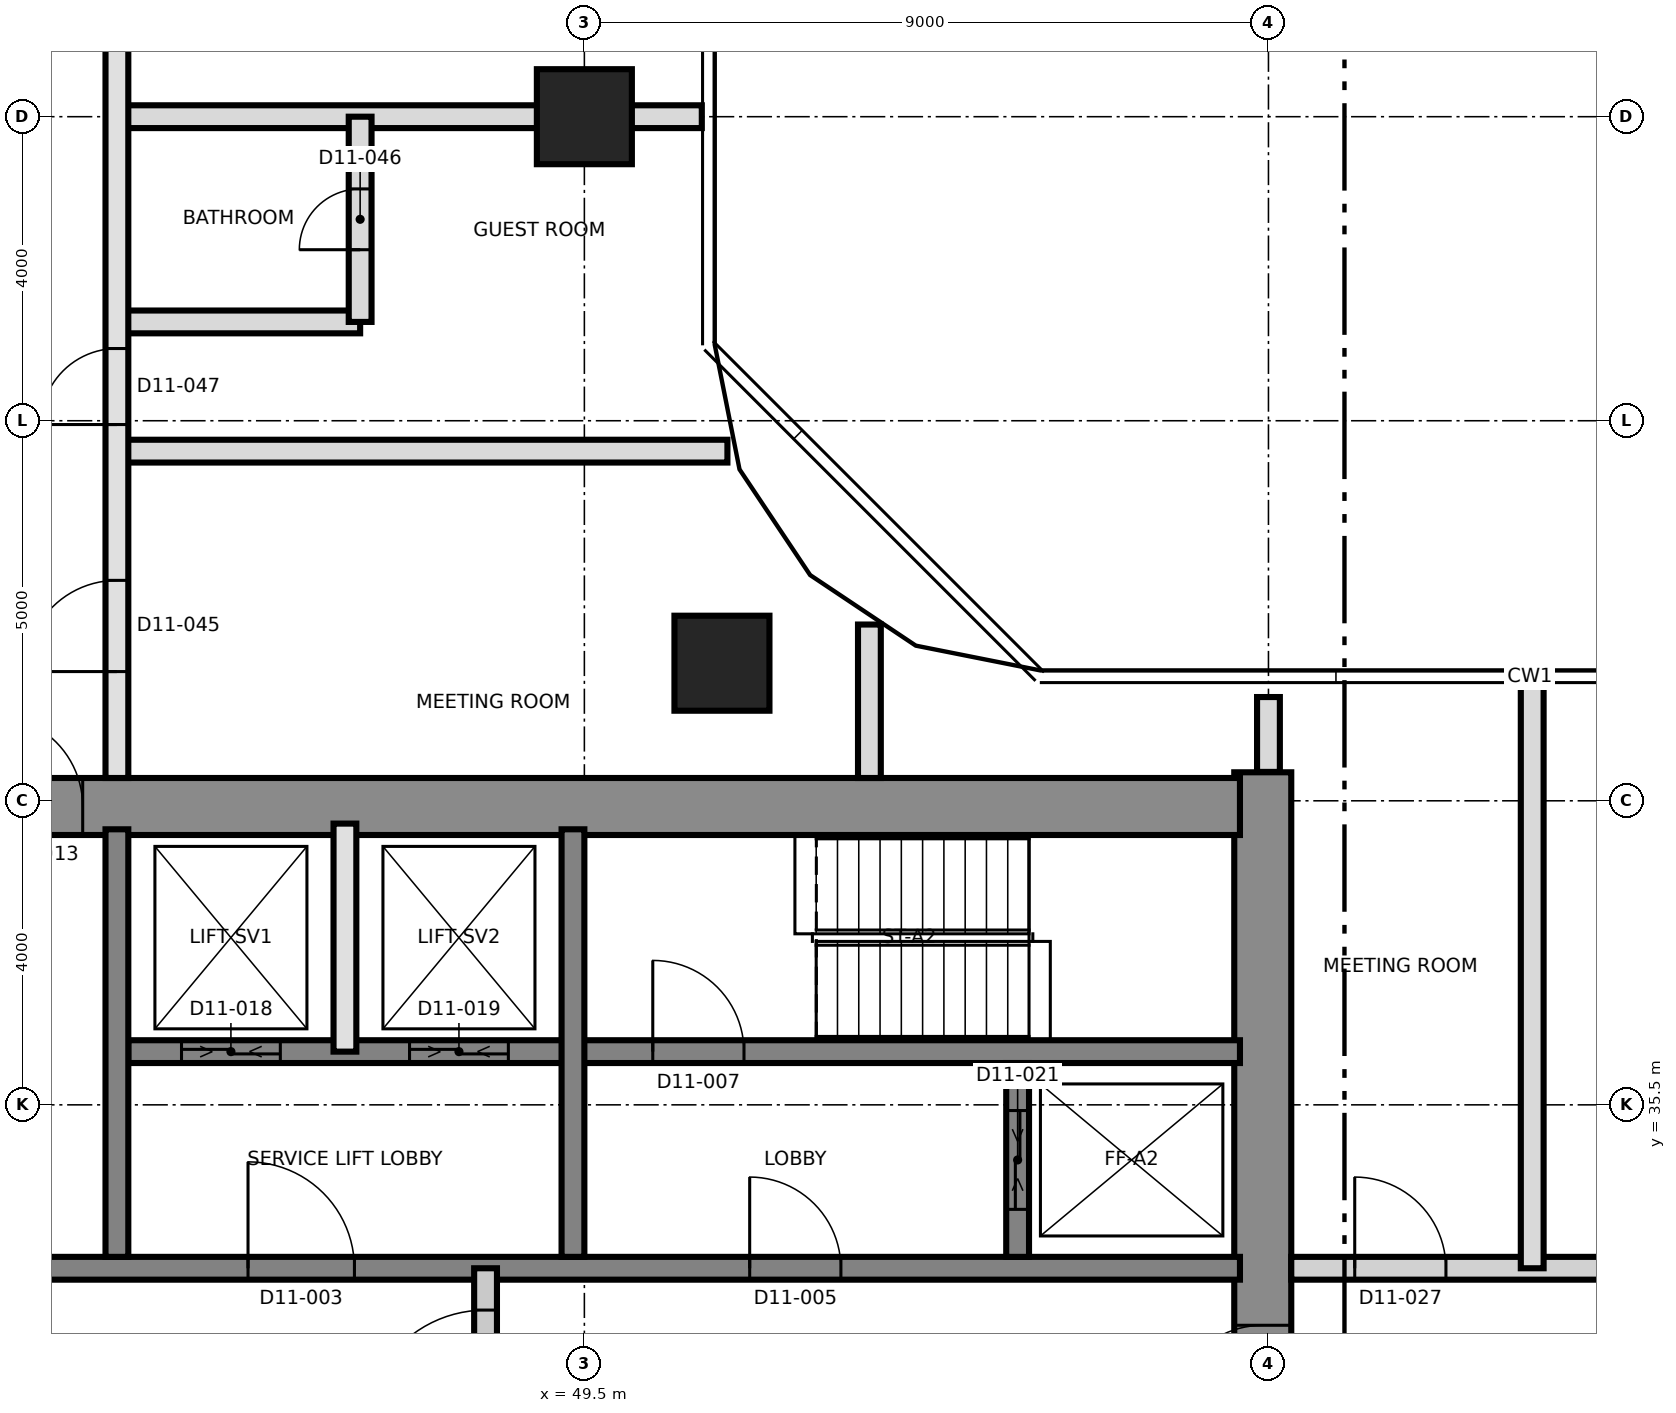
"""IFC4 building model, lengths in metres.
Left out: names, types, materials, properties, quantities, classifications, styles, units other than length and angle.
Written with IfcOpenShell. Run it as: python <this file> out.ifc"""

import sys

from ifc_helpers import new_model, si_unit, direction, frame, frame_2d, origin, origin_2d, place, context, subcontext, project, spatial, rectangle, extrude, element, fill, save


model = new_model("IFC4")
c1 = context("Model", 3, precision=1e-05, world=origin(), true_north=direction((0.0, 1.0)))
c2 = subcontext(c1, "Body", "Model", "MODEL_VIEW")
j1 = project(units=[si_unit("LENGTHUNIT", "METRE"), si_unit("PLANEANGLEUNIT", "RADIAN")], contexts=[c1])
p1 = place(None, origin())
s1 = spatial("IfcSite", under=j1, at=p1, CompositionType="ELEMENT")
p2 = place(p1, origin())
s2 = spatial("IfcBuilding", under=s1, at=p2, CompositionType="ELEMENT")
p3 = place(p2, frame((0.0, 0.0, 127.8)))
s3 = spatial("IfcBuildingStorey", under=s2, at=p3, CompositionType="ELEMENT", Elevation=127.8)
p4 = place(p3, frame((58.425, 21.125, 0.0), z_axis=(0.0, 0.0, 1.0), x_axis=(0.0, 1.0, 0.0)))
e1 = element("IfcWall", 1, at=p4, inside=s3, PredefinedType="SHEAR", context=c2, shape_type="SweptSolid", body=[
    extrude(rectangle(XDim=18.75, YDim=0.75, at=frame_2d((9.375, 0.0))), origin(), (0.0, 0.0, 1.0), 3.7),
])
p5 = place(p4, frame((10.275, 0.0, 0.0)))
e2 = element("IfcOpeningElement", 2, at=p5, cuts=e1, PredefinedType="OPENING", context=c2, shape_type="SweptSolid", body=[
    extrude(rectangle(XDim=1.2, YDim=2.1, at=frame_2d((0.6, 1.05))), frame((0.0, 0.385, 0.0), z_axis=(0.0, -1.0, 0.0), x_axis=(1.0, 0.0, 0.0)), (0.0, 0.0, 1.0), 0.77),
])
p6 = place(p3, frame((31.125, 39.425, 0.0), z_axis=(0.0, 0.0, 1.0), x_axis=(1.0, 0.0, 0.0)))
e3 = element("IfcWall", 3, at=p6, inside=s3, PredefinedType="SHEAR", context=c2, shape_type="SweptSolid", body=[
    extrude(rectangle(XDim=27.0, YDim=0.75, at=frame_2d((13.5, 0.0))), origin(), (0.0, 0.0, 1.0), 3.7),
])
p7 = place(p6, frame((10.575, 0.0, 0.0)))
e4 = element("IfcOpeningElement", 4, at=p7, cuts=e3, PredefinedType="OPENING", context=c2, shape_type="SweptSolid", body=[
    extrude(rectangle(XDim=1.2, YDim=2.1, at=frame_2d((0.6, 1.05))), frame((0.0, 0.385, 0.0), z_axis=(0.0, -1.0, 0.0), x_axis=(1.0, 0.0, 0.0)), (0.0, 0.0, 1.0), 0.77),
])
p8 = place(p3, frame((31.875, 33.35, 0.0), z_axis=(0.0, 0.0, 1.0), x_axis=(1.0, 0.0, 0.0)))
e5 = element("IfcWall", 5, at=p8, inside=s3, PredefinedType="SHEAR", context=c2, shape_type="SweptSolid", body=[
    extrude(rectangle(XDim=26.25, YDim=0.3, at=frame_2d((13.125, 0.0))), origin(), (0.0, 0.0, 1.0), 3.7),
])
p9 = place(p8, frame((13.2, 0.0, 0.0)))
e6 = element("IfcOpeningElement", 6, at=p9, cuts=e5, PredefinedType="OPENING", context=c2, shape_type="SweptSolid", body=[
    extrude(rectangle(XDim=1.4, YDim=2.1, at=frame_2d((0.7, 1.05))), frame((0.0, 0.16, 0.0), z_axis=(0.0, -1.0, 0.0), x_axis=(1.0, 0.0, 0.0)), (0.0, 0.0, 1.0), 0.32),
])
p10 = place(p8, frame((5.25, 0.0, 0.0)))
e7 = element("IfcOpeningElement", 7, at=p10, cuts=e5, PredefinedType="OPENING", context=c2, shape_type="SweptSolid", body=[
    extrude(rectangle(XDim=1.2, YDim=2.1, at=frame_2d((0.6, 1.05))), frame((0.0, 0.16, 0.0), z_axis=(0.0, -1.0, 0.0), x_axis=(1.0, 0.0, 0.0)), (0.0, 0.0, 1.0), 0.32),
])
p11 = place(p8, frame((19.8, 0.0, 0.0)))
e8 = element("IfcOpeningElement", 8, at=p11, cuts=e5, PredefinedType="OPENING", context=c2, shape_type="SweptSolid", body=[
    extrude(rectangle(XDim=1.2, YDim=2.1, at=frame_2d((0.6, 1.05))), frame((0.0, 0.16, 0.0), z_axis=(0.0, -1.0, 0.0), x_axis=(1.0, 0.0, 0.0)), (0.0, 0.0, 1.0), 0.32),
])
p12 = place(p3, frame((43.5, 36.2, 0.0), z_axis=(0.0, 0.0, 1.0), x_axis=(1.0, 0.0, 0.0)))
e9 = element("IfcWall", 9, at=p12, inside=s3, PredefinedType="SHEAR", context=c2, shape_type="SweptSolid", body=[
    extrude(rectangle(XDim=14.625, YDim=0.3, at=frame_2d((7.312, 0.0))), origin(), (0.0, 0.0, 1.0), 3.7),
])
p13 = place(p12, frame((6.9, 0.0, 0.0)))
e10 = element("IfcOpeningElement", 10, at=p13, cuts=e9, PredefinedType="OPENING", context=c2, shape_type="SweptSolid", body=[
    extrude(rectangle(XDim=1.2, YDim=2.1, at=frame_2d((0.6, 1.05))), frame((0.0, 0.16, 0.0), z_axis=(0.0, -1.0, 0.0), x_axis=(1.0, 0.0, 0.0)), (0.0, 0.0, 1.0), 0.32),
])
p14 = place(p12, frame((0.7, 0.0, 0.0)))
e11 = element("IfcOpeningElement", 11, at=p14, cuts=e9, PredefinedType="OPENING", context=c2, shape_type="SweptSolid", body=[
    extrude(rectangle(XDim=1.3, YDim=2.4, at=frame_2d((0.65, 1.2))), frame((0.0, 0.16, 0.0), z_axis=(0.0, -1.0, 0.0), x_axis=(1.0, 0.0, 0.0)), (0.0, 0.0, 1.0), 0.32),
])
p15 = place(p12, frame((3.7, 0.0, 0.0)))
e12 = element("IfcOpeningElement", 12, at=p15, cuts=e9, PredefinedType="OPENING", context=c2, shape_type="SweptSolid", body=[
    extrude(rectangle(XDim=1.3, YDim=2.4, at=frame_2d((0.65, 1.2))), frame((0.0, 0.16, 0.0), z_axis=(0.0, -1.0, 0.0), x_axis=(1.0, 0.0, 0.0)), (0.0, 0.0, 1.0), 0.32),
])
for number, where, z_axis, x_axis in (
    (13, (43.35, 33.5, 0.0), (0.0, 0.0, 1.0), (0.0, 1.0, 0.0)),
    (14, (49.35, 33.5, 0.0), (0.0, 0.0, 1.0), (0.0, 1.0, 0.0)),
):
    element("IfcWall", number, at=place(p3, frame(where, z_axis=z_axis, x_axis=x_axis)), inside=s3, PredefinedType="SHEAR", context=c2, shape_type="SweptSolid", body=[
        extrude(rectangle(XDim=5.625, YDim=0.3, at=frame_2d((2.812, 0.0))), origin(), (0.0, 0.0, 1.0), 3.7),
    ])
p16 = place(p3, frame((55.2, 33.5, 0.0), z_axis=(0.0, 0.0, 1.0), x_axis=(0.0, 1.0, 0.0)))
e15 = element("IfcWall", 15, at=p16, inside=s3, PredefinedType="SHEAR", context=c2, shape_type="SweptSolid", body=[
    extrude(rectangle(XDim=2.55, YDim=0.3, at=frame_2d((1.275, 0.0))), origin(), (0.0, 0.0, 1.0), 3.7),
])
p17 = place(p16, frame((0.625, 0.0, 0.0)))
e16 = element("IfcOpeningElement", 16, at=p17, cuts=e15, PredefinedType="OPENING", context=c2, shape_type="SweptSolid", body=[
    extrude(rectangle(XDim=1.3, YDim=2.4, at=frame_2d((0.65, 1.2))), frame((0.0, 0.16, 0.0), z_axis=(0.0, -1.0, 0.0), x_axis=(1.0, 0.0, 0.0)), (0.0, 0.0, 1.0), 0.32),
])
for number, where, z_axis, x_axis in (
    (17, (51.31, 41.31, 0.0), (0.0, 0.0, 1.0), (1.0, 0.0, 0.0)),
    (18, (49.5, 48.5, 0.0), (0.0, 0.0, 1.0), (1.0, 0.0, 0.0)),
):
    element("IfcColumn", number, at=place(p3, frame(where, z_axis=z_axis, x_axis=x_axis)), inside=s3, PredefinedType="COLUMN", context=c2, shape_type="SweptSolid", body=[
        extrude(rectangle(XDim=1.25, YDim=1.25, at=origin_2d()), origin(), (0.0, 0.0, 1.0), 3.7),
    ])
p18 = place(p3, frame((46.35, 36.2, 0.0), z_axis=(0.0, 0.0, 1.0), x_axis=(0.0, 1.0, 0.0)))
e19 = element("IfcWall", 19, at=p18, inside=s3, PredefinedType="SOLIDWALL", context=c2, shape_type="SweptSolid", body=[
    extrude(rectangle(XDim=3.0, YDim=0.3, at=frame_2d((1.5, 0.0))), origin(), (0.0, 0.0, 1.0), 3.4),
])
p19 = place(p3, frame((48.2, 24.9, 0.0), z_axis=(0.0, 0.0, 1.0), x_axis=(0.0, 1.0, 0.0)))
e20 = element("IfcWall", 20, at=p19, inside=s3, PredefinedType="PARTITIONING", context=c2, shape_type="SweptSolid", body=[
    extrude(rectangle(XDim=8.45, YDim=0.3, at=frame_2d((4.225, 0.0))), origin(), (0.0, 0.0, 1.0), 3.4),
])
p20 = place(p19, frame((6.3, 0.0, 0.0)))
e21 = element("IfcOpeningElement", 21, at=p20, cuts=e20, PredefinedType="OPENING", context=c2, shape_type="SweptSolid", body=[
    extrude(rectangle(XDim=1.6, YDim=2.1, at=frame_2d((0.8, 1.05))), frame((0.0, 0.16, 0.0), z_axis=(0.0, -1.0, 0.0), x_axis=(1.0, 0.0, 0.0)), (0.0, 0.0, 1.0), 0.32),
])
p21 = place(p3, frame((58.8, 33.35, 0.0), z_axis=(0.0, 0.0, 1.0), x_axis=(1.0, 0.0, 0.0)))
e22 = element("IfcWall", 22, at=p21, inside=s3, PredefinedType="PARTITIONING", context=c2, shape_type="SweptSolid", body=[
    extrude(rectangle(XDim=26.53, YDim=0.3, at=frame_2d((13.265, 0.0))), origin(), (0.0, 0.0, 1.0), 3.4),
])
p22 = place(p21, frame((0.835, 0.0, 0.0)))
e23 = element("IfcOpeningElement", 23, at=p22, cuts=e22, PredefinedType="OPENING", context=c2, shape_type="SweptSolid", body=[
    extrude(rectangle(XDim=1.2, YDim=2.1, at=frame_2d((0.6, 1.05))), frame((0.0, 0.16, 0.0), z_axis=(0.0, -1.0, 0.0), x_axis=(1.0, 0.0, 0.0)), (0.0, 0.0, 1.0), 0.32),
])
p23 = place(p21, frame((4.085, 0.0, 0.0)))
e24 = element("IfcOpeningElement", 24, at=p23, cuts=e22, PredefinedType="OPENING", context=c2, shape_type="SweptSolid", body=[
    extrude(rectangle(XDim=1.0, YDim=2.1, at=frame_2d((0.5, 1.05))), frame((0.0, 0.16, 0.0), z_axis=(0.0, -1.0, 0.0), x_axis=(1.0, 0.0, 0.0)), (0.0, 0.0, 1.0), 0.32),
])
p24 = place(p21, frame((12.7, 0.0, 0.0)))
e25 = element("IfcOpeningElement", 25, at=p24, cuts=e22, PredefinedType="OPENING", context=c2, shape_type="SweptSolid", body=[
    extrude(rectangle(XDim=1.0, YDim=2.4, at=frame_2d((0.5, 1.2))), frame((0.0, 0.16, 0.0), z_axis=(0.0, -1.0, 0.0), x_axis=(1.0, 0.0, 0.0)), (0.0, 0.0, 1.0), 0.32),
])
p25 = place(p21, frame((21.115, 0.0, 0.0)))
e26 = element("IfcOpeningElement", 26, at=p25, cuts=e22, PredefinedType="OPENING", context=c2, shape_type="SweptSolid", body=[
    extrude(rectangle(XDim=1.0, YDim=2.1, at=frame_2d((0.5, 1.05))), frame((0.0, 0.16, 0.0), z_axis=(0.0, -1.0, 0.0), x_axis=(1.0, 0.0, 0.0)), (0.0, 0.0, 1.0), 0.32),
])
p26 = place(p21, frame((24.065, 0.0, 0.0)))
e27 = element("IfcOpeningElement", 27, at=p26, cuts=e22, PredefinedType="OPENING", context=c2, shape_type="SweptSolid", body=[
    extrude(rectangle(XDim=1.4, YDim=2.1, at=frame_2d((0.7, 1.05))), frame((0.0, 0.16, 0.0), z_axis=(0.0, -1.0, 0.0), x_axis=(1.0, 0.0, 0.0)), (0.0, 0.0, 1.0), 0.32),
])
p27 = place(p3, frame((43.35, 44.1, 0.0), z_axis=(0.0, 0.0, 1.0), x_axis=(1.0, 0.0, 0.0)))
e28 = element("IfcWall", 28, at=p27, inside=s3, PredefinedType="PARTITIONING", context=c2, shape_type="SweptSolid", body=[
    extrude(rectangle(XDim=8.032, YDim=0.3, at=frame_2d((4.016, 0.0))), origin(), (0.0, 0.0, 1.0), 3.4),
])
p28 = place(p3, frame((43.35, 45.8, 0.0), z_axis=(0.0, 0.0, 1.0), x_axis=(1.0, 0.0, 0.0)))
e29 = element("IfcWall", 29, at=p28, inside=s3, PredefinedType="PARTITIONING", context=c2, shape_type="SweptSolid", body=[
    extrude(rectangle(XDim=3.2, YDim=0.3, at=frame_2d((1.6, 0.0))), origin(), (0.0, 0.0, 1.0), 3.4),
])
p29 = place(p3, frame((43.35, 48.5, 0.0), z_axis=(0.0, 0.0, 1.0), x_axis=(1.0, 0.0, 0.0)))
e30 = element("IfcWall", 30, at=p29, inside=s3, PredefinedType="PARTITIONING", context=c2, shape_type="SweptSolid", body=[
    extrude(rectangle(XDim=7.695, YDim=0.3, at=frame_2d((3.847, 0.0))), origin(), (0.0, 0.0, 1.0), 3.4),
])
p30 = place(p3, frame((43.35, 39.8, 0.0), z_axis=(0.0, 0.0, 1.0), x_axis=(0.0, 1.0, 0.0)))
e31 = element("IfcWall", 31, at=p30, inside=s3, PredefinedType="SOLIDWALL", context=c2, shape_type="SweptSolid", body=[
    extrude(rectangle(XDim=26.0, YDim=0.3, at=frame_2d((13.0, 0.0))), origin(), (0.0, 0.0, 1.0), 3.4),
])
p31 = place(p30, frame((1.4, 0.0, 0.0)))
e32 = element("IfcOpeningElement", 32, at=p31, cuts=e31, PredefinedType="OPENING", context=c2, shape_type="SweptSolid", body=[
    extrude(rectangle(XDim=1.2, YDim=2.1, at=frame_2d((0.6, 1.05))), frame((0.0, 0.16, 0.0), z_axis=(0.0, -1.0, 0.0), x_axis=(1.0, 0.0, 0.0)), (0.0, 0.0, 1.0), 0.32),
])
p32 = place(p30, frame((4.65, 0.0, 0.0)))
e33 = element("IfcOpeningElement", 33, at=p32, cuts=e31, PredefinedType="OPENING", context=c2, shape_type="SweptSolid", body=[
    extrude(rectangle(XDim=1.0, YDim=2.1, at=frame_2d((0.5, 1.05))), frame((0.0, 0.16, 0.0), z_axis=(0.0, -1.0, 0.0), x_axis=(1.0, 0.0, 0.0)), (0.0, 0.0, 1.0), 0.32),
])
p33 = place(p30, frame((9.835, 0.0, 0.0)))
e34 = element("IfcOpeningElement", 34, at=p33, cuts=e31, PredefinedType="OPENING", context=c2, shape_type="SweptSolid", body=[
    extrude(rectangle(XDim=1.2, YDim=2.1, at=frame_2d((0.6, 1.05))), frame((0.0, 0.16, 0.0), z_axis=(0.0, -1.0, 0.0), x_axis=(1.0, 0.0, 0.0)), (0.0, 0.0, 1.0), 0.32),
])
p34 = place(p30, frame((13.085, 0.0, 0.0)))
e35 = element("IfcOpeningElement", 35, at=p34, cuts=e31, PredefinedType="OPENING", context=c2, shape_type="SweptSolid", body=[
    extrude(rectangle(XDim=1.0, YDim=2.1, at=frame_2d((0.5, 1.05))), frame((0.0, 0.16, 0.0), z_axis=(0.0, -1.0, 0.0), x_axis=(1.0, 0.0, 0.0)), (0.0, 0.0, 1.0), 0.32),
])
p35 = place(p30, frame((21.25, 0.0, 0.0)))
e36 = element("IfcOpeningElement", 36, at=p35, cuts=e31, PredefinedType="OPENING", context=c2, shape_type="SweptSolid", body=[
    extrude(rectangle(XDim=1.0, YDim=2.4, at=frame_2d((0.5, 1.2))), frame((0.0, 0.16, 0.0), z_axis=(0.0, -1.0, 0.0), x_axis=(1.0, 0.0, 0.0)), (0.0, 0.0, 1.0), 0.32),
])
p36 = place(p3, frame((46.55, 45.8, 0.0), z_axis=(0.0, 0.0, 1.0), x_axis=(0.0, 1.0, 0.0)))
e37 = element("IfcWall", 37, at=p36, inside=s3, PredefinedType="PARTITIONING", context=c2, shape_type="SweptSolid", body=[
    extrude(rectangle(XDim=2.7, YDim=0.3, at=frame_2d((1.35, 0.0))), origin(), (0.0, 0.0, 1.0), 3.4),
])
p37 = place(p36, frame((0.95, 0.0, 0.0)))
e38 = element("IfcOpeningElement", 38, at=p37, cuts=e37, PredefinedType="OPENING", context=c2, shape_type="SweptSolid", body=[
    extrude(rectangle(XDim=0.8, YDim=2.1, at=frame_2d((0.4, 1.05))), frame((0.0, 0.16, 0.0), z_axis=(0.0, -1.0, 0.0), x_axis=(1.0, 0.0, 0.0)), (0.0, 0.0, 1.0), 0.32),
])
p38 = place(p3, frame((53.25, 39.8, 0.0), z_axis=(0.0, 0.0, 1.0), x_axis=(0.0, 1.0, 0.0)))
e39 = element("IfcWall", 39, at=p38, inside=s3, PredefinedType="PARTITIONING", context=c2, shape_type="SweptSolid", body=[
    extrude(rectangle(XDim=2.019, YDim=0.3, at=frame_2d((1.01, 0.0))), origin(), (0.0, 0.0, 1.0), 3.4),
])
p39 = place(p3, frame((58.5, 39.88, 0.0), z_axis=(0.0, 0.0, 1.0), x_axis=(0.0, 1.0, 0.0)))
e40 = element("IfcWall", 40, at=p39, inside=s3, PredefinedType="PARTITIONING", context=c2, shape_type="SweptSolid", body=[
    extrude(rectangle(XDim=0.985, YDim=0.3, at=frame_2d((0.493, 0.0))), origin(), (0.0, 0.0, 1.0), 3.4),
])
p40 = place(p3, frame((61.97, 33.35, 0.0), z_axis=(0.0, 0.0, 1.0), x_axis=(0.0, 1.0, 0.0)))
e41 = element("IfcWall", 41, at=p40, inside=s3, PredefinedType="PARTITIONING", context=c2, shape_type="SweptSolid", body=[
    extrude(rectangle(XDim=7.695, YDim=0.3, at=frame_2d((3.847, 0.0))), origin(), (0.0, 0.0, 1.0), 3.4),
])
p41 = place(p20, origin())
e42 = element("IfcDoor", 42, at=p41, inside=s3, OperationType="SINGLE_SWING_LEFT", PredefinedType="DOOR", context=c2, shape_type="SweptSolid", body=[
    extrude(rectangle(XDim=1.6, YDim=2.1, at=frame_2d((0.8, 1.05))), frame((0.0, 0.025, 0.0), z_axis=(0.0, -1.0, 0.0), x_axis=(1.0, 0.0, 0.0)), (0.0, 0.0, 1.0), 0.05),
])
fill(e21, e42)
p42 = place(p9, origin())
e43 = element("IfcDoor", 43, at=p42, inside=s3, OperationType="SINGLE_SWING_RIGHT", PredefinedType="DOOR", context=c2, shape_type="SweptSolid", body=[
    extrude(rectangle(XDim=1.4, YDim=2.1, at=frame_2d((0.7, 1.05))), frame((0.0, 0.025, 0.0), z_axis=(0.0, -1.0, 0.0), x_axis=(1.0, 0.0, 0.0)), (0.0, 0.0, 1.0), 0.05),
])
fill(e6, e43)
p43 = place(p11, origin())
e44 = element("IfcDoor", 44, at=p43, inside=s3, OperationType="SINGLE_SWING_RIGHT", PredefinedType="DOOR", context=c2, shape_type="SweptSolid", body=[
    extrude(rectangle(XDim=1.2, YDim=2.1, at=frame_2d((0.6, 1.05))), frame((0.0, 0.025, 0.0), z_axis=(0.0, -1.0, 0.0), x_axis=(1.0, 0.0, 0.0)), (0.0, 0.0, 1.0), 0.05),
])
fill(e8, e44)
p44 = place(p13, origin())
e45 = element("IfcDoor", 45, at=p44, inside=s3, OperationType="SINGLE_SWING_LEFT", PredefinedType="DOOR", context=c2, shape_type="SweptSolid", body=[
    extrude(rectangle(XDim=1.2, YDim=2.1, at=frame_2d((0.6, 1.05))), frame((0.0, 0.025, 0.0), z_axis=(0.0, -1.0, 0.0), x_axis=(1.0, 0.0, 0.0)), (0.0, 0.0, 1.0), 0.05),
])
fill(e10, e45)
p45 = place(p5, origin())
e46 = element("IfcDoor", 46, at=p45, inside=s3, OperationType="SINGLE_SWING_LEFT", PredefinedType="DOOR", context=c2, shape_type="SweptSolid", body=[
    extrude(rectangle(XDim=1.2, YDim=2.1, at=frame_2d((0.6, 1.05))), frame((0.0, 0.025, 0.0), z_axis=(0.0, -1.0, 0.0), x_axis=(1.0, 0.0, 0.0)), (0.0, 0.0, 1.0), 0.05),
])
fill(e2, e46)
p46 = place(p7, origin())
e47 = element("IfcDoor", 47, at=p46, inside=s3, OperationType="SINGLE_SWING_RIGHT", PredefinedType="DOOR", context=c2, shape_type="SweptSolid", body=[
    extrude(rectangle(XDim=1.2, YDim=2.1, at=frame_2d((0.6, 1.05))), frame((0.0, 0.025, 0.0), z_axis=(0.0, -1.0, 0.0), x_axis=(1.0, 0.0, 0.0)), (0.0, 0.0, 1.0), 0.05),
])
fill(e4, e47)
p47 = place(p14, origin())
e48 = element("IfcDoor", 48, at=p47, inside=s3, OperationType="SLIDING_TO_LEFT", PredefinedType="DOOR", context=c2, shape_type="SweptSolid", body=[
    extrude(rectangle(XDim=1.3, YDim=2.4, at=frame_2d((0.65, 1.2))), frame((0.0, 0.025, 0.0), z_axis=(0.0, -1.0, 0.0), x_axis=(1.0, 0.0, 0.0)), (0.0, 0.0, 1.0), 0.05),
])
fill(e11, e48)
p48 = place(p15, origin())
e49 = element("IfcDoor", 49, at=p48, inside=s3, OperationType="SLIDING_TO_LEFT", PredefinedType="DOOR", context=c2, shape_type="SweptSolid", body=[
    extrude(rectangle(XDim=1.3, YDim=2.4, at=frame_2d((0.65, 1.2))), frame((0.0, 0.025, 0.0), z_axis=(0.0, -1.0, 0.0), x_axis=(1.0, 0.0, 0.0)), (0.0, 0.0, 1.0), 0.05),
])
fill(e12, e49)
p49 = place(p17, origin())
e50 = element("IfcDoor", 50, at=p49, inside=s3, OperationType="SLIDING_TO_LEFT", PredefinedType="DOOR", context=c2, shape_type="SweptSolid", body=[
    extrude(rectangle(XDim=1.3, YDim=2.4, at=frame_2d((0.65, 1.2))), frame((0.0, 0.025, 0.0), z_axis=(0.0, -1.0, 0.0), x_axis=(1.0, 0.0, 0.0)), (0.0, 0.0, 1.0), 0.05),
])
fill(e16, e50)
p50 = place(p22, origin())
e51 = element("IfcDoor", 51, at=p50, inside=s3, OperationType="SINGLE_SWING_LEFT", PredefinedType="DOOR", context=c2, shape_type="SweptSolid", body=[
    extrude(rectangle(XDim=1.2, YDim=2.1, at=frame_2d((0.6, 1.05))), frame((0.0, 0.025, 0.0), z_axis=(0.0, -1.0, 0.0), x_axis=(1.0, 0.0, 0.0)), (0.0, 0.0, 1.0), 0.05),
])
fill(e23, e51)
p51 = place(p31, origin())
e52 = element("IfcDoor", 52, at=p51, inside=s3, OperationType="SINGLE_SWING_LEFT", PredefinedType="DOOR", context=c2, shape_type="SweptSolid", body=[
    extrude(rectangle(XDim=1.2, YDim=2.1, at=frame_2d((0.6, 1.05))), frame((0.0, 0.025, 0.0), z_axis=(0.0, -1.0, 0.0), x_axis=(1.0, 0.0, 0.0)), (0.0, 0.0, 1.0), 0.05),
])
fill(e32, e52)
p52 = place(p37, origin())
e53 = element("IfcDoor", 53, at=p52, inside=s3, OperationType="SINGLE_SWING_RIGHT", PredefinedType="DOOR", context=c2, shape_type="SweptSolid", body=[
    extrude(rectangle(XDim=0.8, YDim=2.1, at=frame_2d((0.4, 1.05))), frame((0.0, 0.025, 0.0), z_axis=(0.0, -1.0, 0.0), x_axis=(1.0, 0.0, 0.0)), (0.0, 0.0, 1.0), 0.05),
])
fill(e38, e53)
p53 = place(p32, origin())
e54 = element("IfcDoor", 54, at=p53, inside=s3, OperationType="SINGLE_SWING_LEFT", PredefinedType="DOOR", context=c2, shape_type="SweptSolid", body=[
    extrude(rectangle(XDim=1.0, YDim=2.1, at=frame_2d((0.5, 1.05))), frame((0.0, 0.025, 0.0), z_axis=(0.0, -1.0, 0.0), x_axis=(1.0, 0.0, 0.0)), (0.0, 0.0, 1.0), 0.05),
])
fill(e33, e54)
save(model, sys.argv[1])
